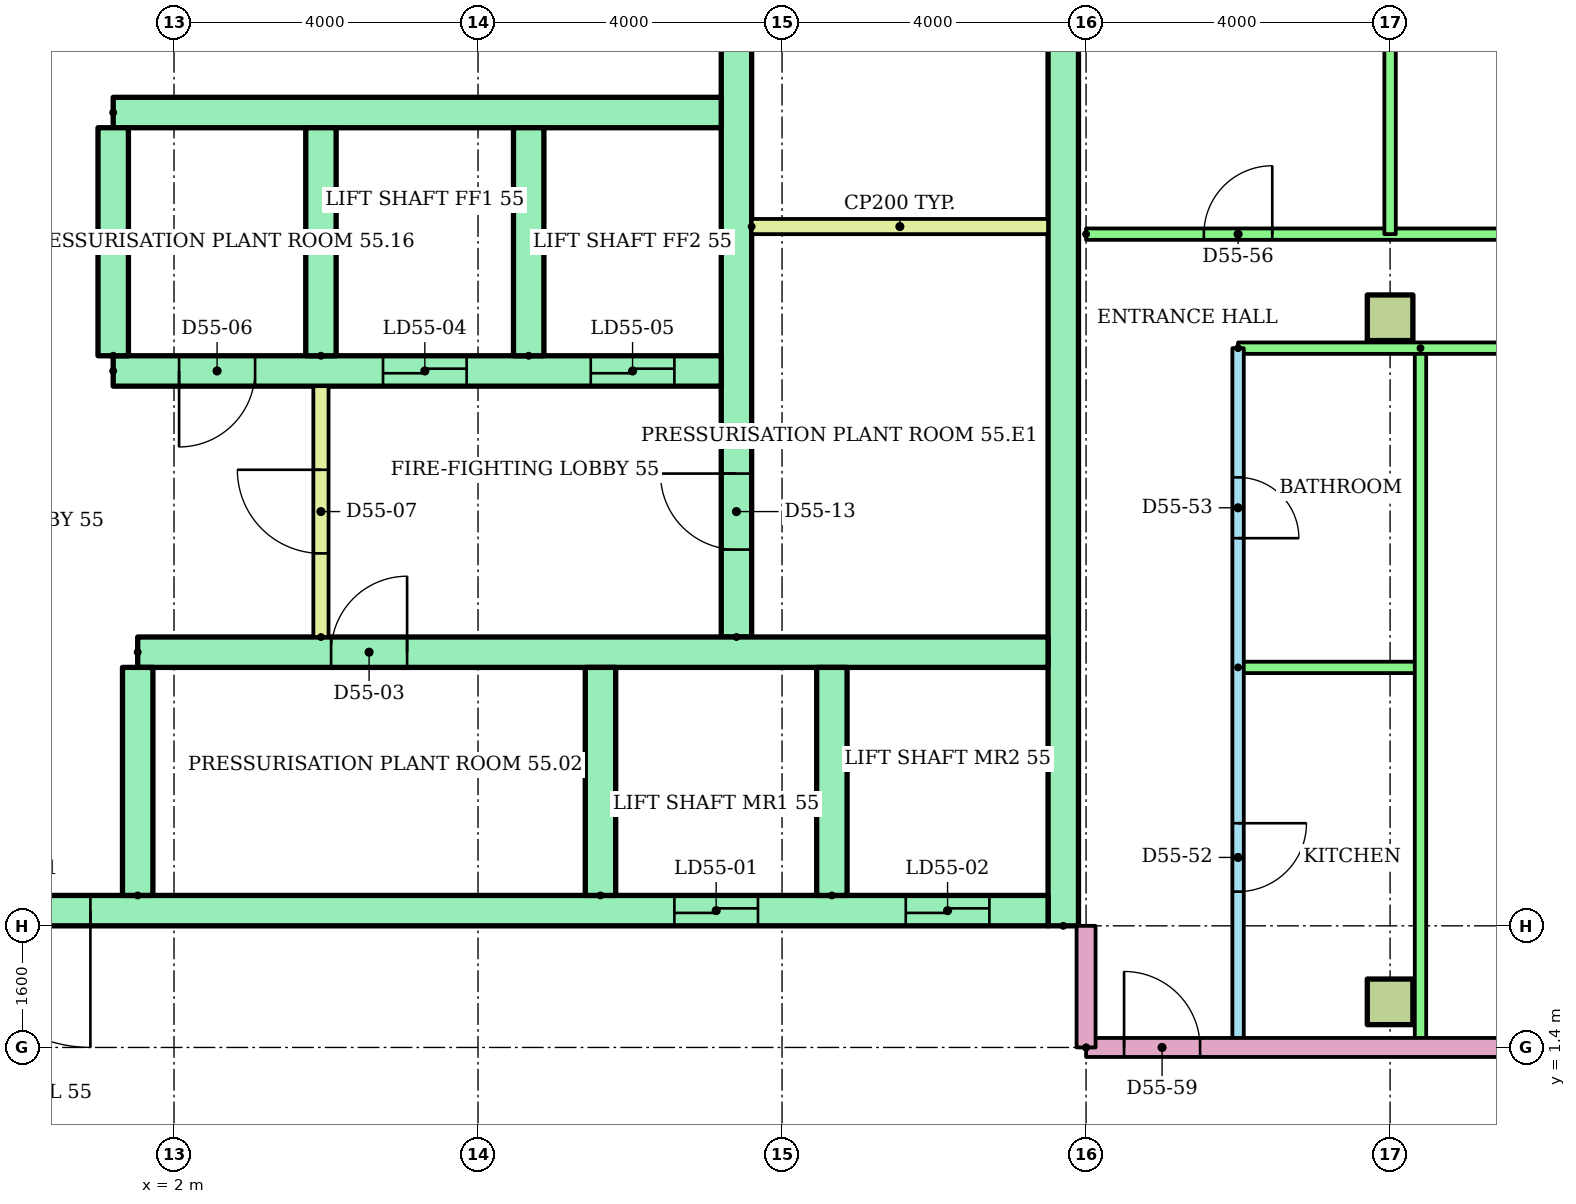
"""IFC4 building model, lengths in metres.
Left out: names, types, materials, properties, quantities, classifications, styles, units other than length and angle.
Written with IfcOpenShell. Run it as: python <this file> out.ifc"""

import sys

from ifc_helpers import new_model, si_unit, direction, frame, frame_2d, origin, origin_2d, place, context, subcontext, project, spatial, rectangle, extrude, element, fill, save


model = new_model("IFC4")
c1 = context("Model", 3, precision=1e-05, world=origin(), true_north=direction((0.0, 1.0)))
c2 = subcontext(c1, "Body", "Model", "MODEL_VIEW")
j1 = project(units=[si_unit("LENGTHUNIT", "METRE"), si_unit("PLANEANGLEUNIT", "RADIAN")], contexts=[c1])
p1 = place(None, origin())
s1 = spatial("IfcSite", under=j1, at=p1, CompositionType="ELEMENT")
p2 = place(p1, origin())
s2 = spatial("IfcBuilding", under=s1, at=p2, CompositionType="ELEMENT")
p3 = place(p2, frame((0.0, 0.0, 214.0)))
s3 = spatial("IfcBuildingStorey", under=s2, at=p3, CompositionType="ELEMENT", Elevation=214.0)
for number, where in (
    (1, (18.0, 2.0, 0.0)),
    (2, (18.0, 11.0, 0.0)),
):
    element("IfcColumn", number, at=place(p3, frame(where)), inside=s3, PredefinedType="COLUMN", context=c2, shape_type="SweptSolid", body=[
        extrude(rectangle(XDim=0.6, YDim=0.6, at=origin_2d()), origin(), (0.0, 0.0, 1.0), 3.2),
    ])
p4 = place(p3, frame((13.7, 3.0, 0.0), z_axis=(0.0, 0.0, 1.0), x_axis=(0.0, 1.0, 0.0)))
e3 = element("IfcWall", 3, at=p4, inside=s3, PredefinedType="SHEAR", context=c2, shape_type="SweptSolid", body=[
    extrude(rectangle(XDim=17.0, YDim=0.4, at=frame_2d((8.5, 0.0))), origin(), (0.0, 0.0, 1.0), 2.92),
])
p5 = place(p3, frame((9.4, 6.8, 0.0), z_axis=(0.0, 0.0, 1.0), x_axis=(0.0, 1.0, 0.0)))
e4 = element("IfcWall", 4, at=p5, inside=s3, PredefinedType="SHEAR", context=c2, shape_type="SweptSolid", body=[
    extrude(rectangle(XDim=12.7, YDim=0.4, at=frame_2d((6.35, 0.0))), origin(), (0.0, 0.0, 1.0), 2.92),
])
p6 = place(p5, frame((1.15, 0.0, 0.0)))
e5 = element("IfcOpeningElement", 5, at=p6, cuts=e4, PredefinedType="OPENING", context=c2, shape_type="SweptSolid", body=[
    extrude(rectangle(XDim=1.0, YDim=2.1, at=frame_2d((0.5, 1.05))), frame((0.0, 0.21, 0.0), z_axis=(0.0, -1.0, 0.0), x_axis=(1.0, 0.0, 0.0)), (0.0, 0.0, 1.0), 0.42),
])
p7 = place(p5, frame((7.925, 0.0, 0.0)))
e6 = element("IfcOpeningElement", 6, at=p7, cuts=e4, PredefinedType="OPENING", context=c2, shape_type="SweptSolid", body=[
    extrude(rectangle(XDim=1.0, YDim=2.1, at=frame_2d((0.5, 1.05))), frame((0.0, 0.21, 0.0), z_axis=(0.0, -1.0, 0.0), x_axis=(1.0, 0.0, 0.0)), (0.0, 0.0, 1.0), 0.42),
])
p8 = place(p3, frame((-13.5, 3.2, 0.0)))
e7 = element("IfcWall", 7, at=p8, inside=s3, PredefinedType="SHEAR", context=c2, shape_type="SweptSolid", body=[
    extrude(rectangle(XDim=27.0, YDim=0.4, at=frame_2d((13.5, 0.0))), origin(), (0.0, 0.0, 1.0), 2.92),
])
p9 = place(p8, frame((22.083, 0.0, 0.0)))
e8 = element("IfcOpeningElement", 8, at=p9, cuts=e7, PredefinedType="OPENING", context=c2, shape_type="SweptSolid", body=[
    extrude(rectangle(XDim=1.1, YDim=2.1, at=frame_2d((0.55, 1.05))), frame((0.0, 0.21, 0.0), z_axis=(0.0, -1.0, 0.0), x_axis=(1.0, 0.0, 0.0)), (0.0, 0.0, 1.0), 0.42),
])
p10 = place(p8, frame((25.128, 0.0, 0.0)))
e9 = element("IfcOpeningElement", 9, at=p10, cuts=e7, PredefinedType="OPENING", context=c2, shape_type="SweptSolid", body=[
    extrude(rectangle(XDim=1.1, YDim=2.1, at=frame_2d((0.55, 1.05))), frame((0.0, 0.21, 0.0), z_axis=(0.0, -1.0, 0.0), x_axis=(1.0, 0.0, 0.0)), (0.0, 0.0, 1.0), 0.42),
])
p11 = place(p8, frame((12.6, 0.0, 0.0)))
e10 = element("IfcOpeningElement", 10, at=p11, cuts=e7, PredefinedType="OPENING", context=c2, shape_type="SweptSolid", body=[
    extrude(rectangle(XDim=1.8, YDim=2.1, at=frame_2d((0.9, 1.05))), frame((0.0, 0.21, 0.0), z_axis=(0.0, -1.0, 0.0), x_axis=(1.0, 0.0, 0.0)), (0.0, 0.0, 1.0), 0.42),
])
p12 = place(p3, frame((1.522, 6.6, 0.0)))
e11 = element("IfcWall", 11, at=p12, inside=s3, PredefinedType="SHEAR", context=c2, shape_type="SweptSolid", body=[
    extrude(rectangle(XDim=11.978, YDim=0.4, at=frame_2d((5.989, 0.0))), origin(), (0.0, 0.0, 1.0), 2.92),
])
p13 = place(p12, frame((2.544, 0.0, 0.0)))
e12 = element("IfcOpeningElement", 12, at=p13, cuts=e11, PredefinedType="OPENING", context=c2, shape_type="SweptSolid", body=[
    extrude(rectangle(XDim=1.0, YDim=2.1, at=frame_2d((0.5, 1.05))), frame((0.0, 0.21, 0.0), z_axis=(0.0, -1.0, 0.0), x_axis=(1.0, 0.0, 0.0)), (0.0, 0.0, 1.0), 0.42),
])
for number, where, z_axis, x_axis in (
    (13, (1.522, 3.4, 0.0), (0.0, 0.0, 1.0), (0.0, 1.0, 0.0)),
    (14, (7.611, 3.4, 0.0), (0.0, 0.0, 1.0), (0.0, 1.0, 0.0)),
    (15, (10.656, 3.4, 0.0), (0.0, 0.0, 1.0), (0.0, 1.0, 0.0)),
):
    element("IfcWall", number, at=place(p3, frame(where, z_axis=z_axis, x_axis=x_axis)), inside=s3, PredefinedType="SHEAR", context=c2, shape_type="SweptSolid", body=[
        extrude(rectangle(XDim=3.0, YDim=0.4, at=frame_2d((1.5, 0.0))), origin(), (0.0, 0.0, 1.0), 2.92),
    ])
p14 = place(p3, frame((1.2, 10.3, 0.0)))
e16 = element("IfcWall", 16, at=p14, inside=s3, PredefinedType="SHEAR", context=c2, shape_type="SweptSolid", body=[
    extrude(rectangle(XDim=8.0, YDim=0.4, at=frame_2d((4.0, 0.0))), origin(), (0.0, 0.0, 1.0), 2.92),
])
p15 = place(p14, frame((3.55, 0.0, 0.0)))
e17 = element("IfcOpeningElement", 17, at=p15, cuts=e16, PredefinedType="OPENING", context=c2, shape_type="SweptSolid", body=[
    extrude(rectangle(XDim=1.1, YDim=2.1, at=frame_2d((0.55, 1.05))), frame((0.0, 0.21, 0.0), z_axis=(0.0, -1.0, 0.0), x_axis=(1.0, 0.0, 0.0)), (0.0, 0.0, 1.0), 0.42),
])
p16 = place(p14, frame((6.283, 0.0, 0.0)))
e18 = element("IfcOpeningElement", 18, at=p16, cuts=e16, PredefinedType="OPENING", context=c2, shape_type="SweptSolid", body=[
    extrude(rectangle(XDim=1.1, YDim=2.1, at=frame_2d((0.55, 1.05))), frame((0.0, 0.21, 0.0), z_axis=(0.0, -1.0, 0.0), x_axis=(1.0, 0.0, 0.0)), (0.0, 0.0, 1.0), 0.42),
])
p17 = place(p14, frame((0.867, 0.0, 0.0)))
e19 = element("IfcOpeningElement", 19, at=p17, cuts=e16, PredefinedType="OPENING", context=c2, shape_type="SweptSolid", body=[
    extrude(rectangle(XDim=1.0, YDim=2.1, at=frame_2d((0.5, 1.05))), frame((0.0, 0.21, 0.0), z_axis=(0.0, -1.0, 0.0), x_axis=(1.0, 0.0, 0.0)), (0.0, 0.0, 1.0), 0.42),
])
p18 = place(p3, frame((1.2, 13.7, 0.0)))
e20 = element("IfcWall", 20, at=p18, inside=s3, PredefinedType="SHEAR", context=c2, shape_type="SweptSolid", body=[
    extrude(rectangle(XDim=8.0, YDim=0.4, at=frame_2d((4.0, 0.0))), origin(), (0.0, 0.0, 1.0), 2.92),
])
for number, where, z_axis, x_axis in (
    (21, (1.2, 10.5, 0.0), (0.0, 0.0, 1.0), (0.0, 1.0, 0.0)),
    (22, (3.933, 10.5, 0.0), (0.0, 0.0, 1.0), (0.0, 1.0, 0.0)),
    (23, (6.667, 10.5, 0.0), (0.0, 0.0, 1.0), (0.0, 1.0, 0.0)),
):
    element("IfcWall", number, at=place(p3, frame(where, z_axis=z_axis, x_axis=x_axis)), inside=s3, PredefinedType="SHEAR", context=c2, shape_type="SweptSolid", body=[
        extrude(rectangle(XDim=3.0, YDim=0.4, at=frame_2d((1.5, 0.0))), origin(), (0.0, 0.0, 1.0), 2.92),
    ])
p19 = place(p3, frame((3.933, 6.8, 0.0), z_axis=(0.0, 0.0, 1.0), x_axis=(0.0, 1.0, 0.0)))
e24 = element("IfcWall", 24, at=p19, inside=s3, PredefinedType="PARTITIONING", context=c2, shape_type="SweptSolid", body=[
    extrude(rectangle(XDim=3.3, YDim=0.2, at=frame_2d((1.65, 0.0))), origin(), (0.0, 0.0, 1.0), 2.92),
])
p20 = place(p19, frame((1.1, 0.0, 0.0)))
e25 = element("IfcOpeningElement", 25, at=p20, cuts=e24, PredefinedType="OPENING", context=c2, shape_type="SweptSolid", body=[
    extrude(rectangle(XDim=1.1, YDim=2.1, at=frame_2d((0.55, 1.05))), frame((0.0, 0.11, 0.0), z_axis=(0.0, -1.0, 0.0), x_axis=(1.0, 0.0, 0.0)), (0.0, 0.0, 1.0), 0.22),
])
p21 = place(p3, frame((9.6, 12.2, 0.0)))
e26 = element("IfcWall", 26, at=p21, inside=s3, PredefinedType="PARTITIONING", context=c2, shape_type="SweptSolid", body=[
    extrude(rectangle(XDim=3.9, YDim=0.2, at=frame_2d((1.95, 0.0))), origin(), (0.0, 0.0, 1.0), 2.92),
])
p22 = place(p3, frame((16.0, 10.6, 0.0), z_axis=(0.0, 0.0, 1.0), x_axis=(0.0, -1.0, 0.0)))
e27 = element("IfcWall", 27, at=p22, inside=s3, PredefinedType="PARTITIONING", context=c2, shape_type="SweptSolid", body=[
    extrude(rectangle(XDim=9.2, YDim=0.15, at=frame_2d((4.6, 0.0))), origin(), (0.0, 0.0, 1.0), 2.4),
])
p23 = place(p22, frame((6.25, 0.0, 0.0)))
e28 = element("IfcOpeningElement", 28, at=p23, cuts=e27, PredefinedType="OPENING", context=c2, shape_type="SweptSolid", body=[
    extrude(rectangle(XDim=0.9, YDim=2.1, at=frame_2d((0.45, 1.05))), frame((0.0, 0.085, 0.0), z_axis=(0.0, -1.0, 0.0), x_axis=(1.0, 0.0, 0.0)), (0.0, 0.0, 1.0), 0.17),
])
p24 = place(p22, frame((1.7, 0.0, 0.0)))
e29 = element("IfcOpeningElement", 29, at=p24, cuts=e27, PredefinedType="OPENING", context=c2, shape_type="SweptSolid", body=[
    extrude(rectangle(XDim=0.8, YDim=2.1, at=frame_2d((0.4, 1.05))), frame((0.0, 0.085, 0.0), z_axis=(0.0, -1.0, 0.0), x_axis=(1.0, 0.0, 0.0)), (0.0, 0.0, 1.0), 0.17),
])
p25 = place(p3, frame((16.0, 6.4, 0.0)))
e30 = element("IfcWall", 30, at=p25, inside=s3, PredefinedType="PARTITIONING", context=c2, shape_type="SweptSolid", body=[
    extrude(rectangle(XDim=2.4, YDim=0.15, at=frame_2d((1.2, 0.0))), origin(), (0.0, 0.0, 1.0), 2.4),
])
p26 = place(p3, frame((18.4, 10.6, 0.0), z_axis=(0.0, 0.0, 1.0), x_axis=(0.0, -1.0, 0.0)))
e31 = element("IfcWall", 31, at=p26, inside=s3, PredefinedType="PARTITIONING", context=c2, shape_type="SweptSolid", body=[
    extrude(rectangle(XDim=9.2, YDim=0.15, at=frame_2d((4.6, 0.0))), origin(), (0.0, 0.0, 1.0), 2.4),
])
p27 = place(p3, frame((28.91, 10.6, 0.0), z_axis=(0.0, 0.0, 1.0), x_axis=(-1.0, 0.0, 0.0)))
e32 = element("IfcWall", 32, at=p27, inside=s3, PredefinedType="PARTITIONING", context=c2, shape_type="SweptSolid", body=[
    extrude(rectangle(XDim=12.91, YDim=0.15, at=frame_2d((6.455, 0.0))), origin(), (0.0, 0.0, 1.0), 2.4),
])
p28 = place(p27, frame((7.06, 0.0, 0.0)))
e33 = element("IfcOpeningElement", 33, at=p28, cuts=e32, PredefinedType="OPENING", context=c2, shape_type="SweptSolid", body=[
    extrude(rectangle(XDim=0.9, YDim=2.1, at=frame_2d((0.45, 1.05))), frame((0.0, 0.085, 0.0), z_axis=(0.0, -1.0, 0.0), x_axis=(1.0, 0.0, 0.0)), (0.0, 0.0, 1.0), 0.17),
])
p29 = place(p27, frame((1.534, 0.0, 0.0)))
e34 = element("IfcOpeningElement", 34, at=p29, cuts=e32, PredefinedType="OPENING", context=c2, shape_type="SweptSolid", body=[
    extrude(rectangle(XDim=0.9, YDim=2.1, at=frame_2d((0.45, 1.05))), frame((0.0, 0.085, 0.0), z_axis=(0.0, -1.0, 0.0), x_axis=(1.0, 0.0, 0.0)), (0.0, 0.0, 1.0), 0.17),
])
p30 = place(p3, frame((14.0, 12.1, 0.0)))
e35 = element("IfcWall", 35, at=p30, inside=s3, PredefinedType="PARTITIONING", context=c2, shape_type="SweptSolid", body=[
    extrude(rectangle(XDim=14.92, YDim=0.15, at=frame_2d((7.46, 0.0))), origin(), (0.0, 0.0, 1.0), 2.4),
])
p31 = place(p30, frame((1.55, 0.0, 0.0)))
e36 = element("IfcOpeningElement", 36, at=p31, cuts=e35, PredefinedType="OPENING", context=c2, shape_type="SweptSolid", body=[
    extrude(rectangle(XDim=0.9, YDim=2.1, at=frame_2d((0.45, 1.05))), frame((0.0, 0.085, 0.0), z_axis=(0.0, -1.0, 0.0), x_axis=(1.0, 0.0, 0.0)), (0.0, 0.0, 1.0), 0.17),
])
p32 = place(p30, frame((6.65, 0.0, 0.0)))
e37 = element("IfcOpeningElement", 37, at=p32, cuts=e35, PredefinedType="OPENING", context=c2, shape_type="SweptSolid", body=[
    extrude(rectangle(XDim=0.9, YDim=2.1, at=frame_2d((0.45, 1.05))), frame((0.0, 0.085, 0.0), z_axis=(0.0, -1.0, 0.0), x_axis=(1.0, 0.0, 0.0)), (0.0, 0.0, 1.0), 0.17),
])
p33 = place(p30, frame((12.476, 0.0, 0.0)))
e38 = element("IfcOpeningElement", 38, at=p33, cuts=e35, PredefinedType="OPENING", context=c2, shape_type="SweptSolid", body=[
    extrude(rectangle(XDim=1.0, YDim=2.1, at=frame_2d((0.5, 1.05))), frame((0.0, 0.085, 0.0), z_axis=(0.0, -1.0, 0.0), x_axis=(1.0, 0.0, 0.0)), (0.0, 0.0, 1.0), 0.17),
])
p34 = place(p3, frame((18.0, 18.921, 0.0), z_axis=(0.0, 0.0, 1.0), x_axis=(0.0, -1.0, 0.0)))
e39 = element("IfcWall", 39, at=p34, inside=s3, PredefinedType="PARTITIONING", context=c2, shape_type="SweptSolid", body=[
    extrude(rectangle(XDim=6.821, YDim=0.15, at=frame_2d((3.41, 0.0))), origin(), (0.0, 0.0, 1.0), 2.4),
])
p35 = place(p3, frame((14.0, 1.4, 0.0)))
e40 = element("IfcWall", 40, at=p35, inside=s3, PredefinedType="PARTITIONING", context=c2, shape_type="SweptSolid", body=[
    extrude(rectangle(XDim=14.92, YDim=0.25, at=frame_2d((7.46, 0.0))), origin(), (0.0, 0.0, 1.0), 2.4),
])
p36 = place(p35, frame((0.5, 0.0, 0.0)))
e41 = element("IfcOpeningElement", 41, at=p36, cuts=e40, PredefinedType="OPENING", context=c2, shape_type="SweptSolid", body=[
    extrude(rectangle(XDim=1.0, YDim=2.1, at=frame_2d((0.5, 1.05))), frame((0.0, 0.135, 0.0), z_axis=(0.0, -1.0, 0.0), x_axis=(1.0, 0.0, 0.0)), (0.0, 0.0, 1.0), 0.27),
])
p37 = place(p3, frame((14.0, 1.4, 0.0), z_axis=(0.0, 0.0, 1.0), x_axis=(0.0, 1.0, 0.0)))
e42 = element("IfcWall", 42, at=p37, inside=s3, PredefinedType="PARTITIONING", context=c2, shape_type="SweptSolid", body=[
    extrude(rectangle(XDim=1.6, YDim=0.25, at=frame_2d((0.8, 0.0))), origin(), (0.0, 0.0, 1.0), 2.4),
])
p38 = place(p9, origin())
e43 = element("IfcDoor", 43, at=p38, inside=s3, OperationType="SLIDING_TO_LEFT", PredefinedType="DOOR", context=c2, shape_type="SweptSolid", body=[
    extrude(rectangle(XDim=1.1, YDim=2.1, at=frame_2d((0.55, 1.05))), frame((0.0, 0.025, 0.0), z_axis=(0.0, -1.0, 0.0), x_axis=(1.0, 0.0, 0.0)), (0.0, 0.0, 1.0), 0.05),
])
fill(e8, e43)
p39 = place(p10, origin())
e44 = element("IfcDoor", 44, at=p39, inside=s3, OperationType="SLIDING_TO_LEFT", PredefinedType="DOOR", context=c2, shape_type="SweptSolid", body=[
    extrude(rectangle(XDim=1.1, YDim=2.1, at=frame_2d((0.55, 1.05))), frame((0.0, 0.025, 0.0), z_axis=(0.0, -1.0, 0.0), x_axis=(1.0, 0.0, 0.0)), (0.0, 0.0, 1.0), 0.05),
])
fill(e9, e44)
p40 = place(p11, frame((1.8, 0.0, 0.0), z_axis=(0.0, 0.0, 1.0), x_axis=(-1.0, 0.0, 0.0)))
e45 = element("IfcDoor", 45, at=p40, inside=s3, OperationType="DOUBLE_DOOR_SINGLE_SWING", PredefinedType="DOOR", context=c2, shape_type="SweptSolid", body=[
    extrude(rectangle(XDim=1.8, YDim=2.1, at=frame_2d((0.9, 1.05))), frame((0.0, 0.025, 0.0), z_axis=(0.0, -1.0, 0.0), x_axis=(1.0, 0.0, 0.0)), (0.0, 0.0, 1.0), 0.05),
])
fill(e10, e45)
p41 = place(p13, origin())
e46 = element("IfcDoor", 46, at=p41, inside=s3, OperationType="SINGLE_SWING_RIGHT", PredefinedType="DOOR", context=c2, shape_type="SweptSolid", body=[
    extrude(rectangle(XDim=1.0, YDim=2.1, at=frame_2d((0.5, 1.05))), frame((0.0, 0.025, 0.0), z_axis=(0.0, -1.0, 0.0), x_axis=(1.0, 0.0, 0.0)), (0.0, 0.0, 1.0), 0.05),
])
fill(e12, e46)
p42 = place(p15, origin())
e47 = element("IfcDoor", 47, at=p42, inside=s3, OperationType="SLIDING_TO_LEFT", PredefinedType="DOOR", context=c2, shape_type="SweptSolid", body=[
    extrude(rectangle(XDim=1.1, YDim=2.1, at=frame_2d((0.55, 1.05))), frame((0.0, 0.025, 0.0), z_axis=(0.0, -1.0, 0.0), x_axis=(1.0, 0.0, 0.0)), (0.0, 0.0, 1.0), 0.05),
])
fill(e17, e47)
p43 = place(p16, origin())
e48 = element("IfcDoor", 48, at=p43, inside=s3, OperationType="SLIDING_TO_LEFT", PredefinedType="DOOR", context=c2, shape_type="SweptSolid", body=[
    extrude(rectangle(XDim=1.1, YDim=2.1, at=frame_2d((0.55, 1.05))), frame((0.0, 0.025, 0.0), z_axis=(0.0, -1.0, 0.0), x_axis=(1.0, 0.0, 0.0)), (0.0, 0.0, 1.0), 0.05),
])
fill(e18, e48)
p44 = place(p17, frame((1.0, 0.0, 0.0), z_axis=(0.0, 0.0, 1.0), x_axis=(-1.0, 0.0, 0.0)))
e49 = element("IfcDoor", 49, at=p44, inside=s3, OperationType="SINGLE_SWING_LEFT", PredefinedType="DOOR", context=c2, shape_type="SweptSolid", body=[
    extrude(rectangle(XDim=1.0, YDim=2.1, at=frame_2d((0.5, 1.05))), frame((0.0, 0.025, 0.0), z_axis=(0.0, -1.0, 0.0), x_axis=(1.0, 0.0, 0.0)), (0.0, 0.0, 1.0), 0.05),
])
fill(e19, e49)
p45 = place(p20, origin())
e50 = element("IfcDoor", 50, at=p45, inside=s3, OperationType="SINGLE_SWING_RIGHT", PredefinedType="DOOR", context=c2, shape_type="SweptSolid", body=[
    extrude(rectangle(XDim=1.1, YDim=2.1, at=frame_2d((0.55, 1.05))), frame((0.0, 0.025, 0.0), z_axis=(0.0, -1.0, 0.0), x_axis=(1.0, 0.0, 0.0)), (0.0, 0.0, 1.0), 0.05),
])
fill(e25, e50)
p46 = place(p6, origin())
e51 = element("IfcDoor", 51, at=p46, inside=s3, OperationType="SINGLE_SWING_RIGHT", PredefinedType="DOOR", context=c2, shape_type="SweptSolid", body=[
    extrude(rectangle(XDim=1.0, YDim=2.1, at=frame_2d((0.5, 1.05))), frame((0.0, 0.025, 0.0), z_axis=(0.0, -1.0, 0.0), x_axis=(1.0, 0.0, 0.0)), (0.0, 0.0, 1.0), 0.05),
])
fill(e5, e51)
p47 = place(p23, origin())
e52 = element("IfcDoor", 52, at=p47, inside=s3, OperationType="SINGLE_SWING_LEFT", PredefinedType="DOOR", context=c2, shape_type="SweptSolid", body=[
    extrude(rectangle(XDim=0.9, YDim=2.1, at=frame_2d((0.45, 1.05))), frame((0.0, 0.025, 0.0), z_axis=(0.0, -1.0, 0.0), x_axis=(1.0, 0.0, 0.0)), (0.0, 0.0, 1.0), 0.05),
])
fill(e28, e52)
p48 = place(p24, origin())
e53 = element("IfcDoor", 53, at=p48, inside=s3, OperationType="SINGLE_SWING_RIGHT", PredefinedType="DOOR", context=c2, shape_type="SweptSolid", body=[
    extrude(rectangle(XDim=0.8, YDim=2.1, at=frame_2d((0.4, 1.05))), frame((0.0, 0.025, 0.0), z_axis=(0.0, -1.0, 0.0), x_axis=(1.0, 0.0, 0.0)), (0.0, 0.0, 1.0), 0.05),
])
fill(e29, e53)
p49 = place(p31, origin())
e54 = element("IfcDoor", 54, at=p49, inside=s3, OperationType="SINGLE_SWING_RIGHT", PredefinedType="DOOR", context=c2, shape_type="SweptSolid", body=[
    extrude(rectangle(XDim=0.9, YDim=2.1, at=frame_2d((0.45, 1.05))), frame((0.0, 0.025, 0.0), z_axis=(0.0, -1.0, 0.0), x_axis=(1.0, 0.0, 0.0)), (0.0, 0.0, 1.0), 0.05),
])
fill(e36, e54)
p50 = place(p36, origin())
e55 = element("IfcDoor", 55, at=p50, inside=s3, OperationType="SINGLE_SWING_LEFT", PredefinedType="DOOR", context=c2, shape_type="SweptSolid", body=[
    extrude(rectangle(XDim=1.0, YDim=2.1, at=frame_2d((0.5, 1.05))), frame((0.0, 0.025, 0.0), z_axis=(0.0, -1.0, 0.0), x_axis=(1.0, 0.0, 0.0)), (0.0, 0.0, 1.0), 0.05),
])
fill(e41, e55)
save(model, sys.argv[1])
